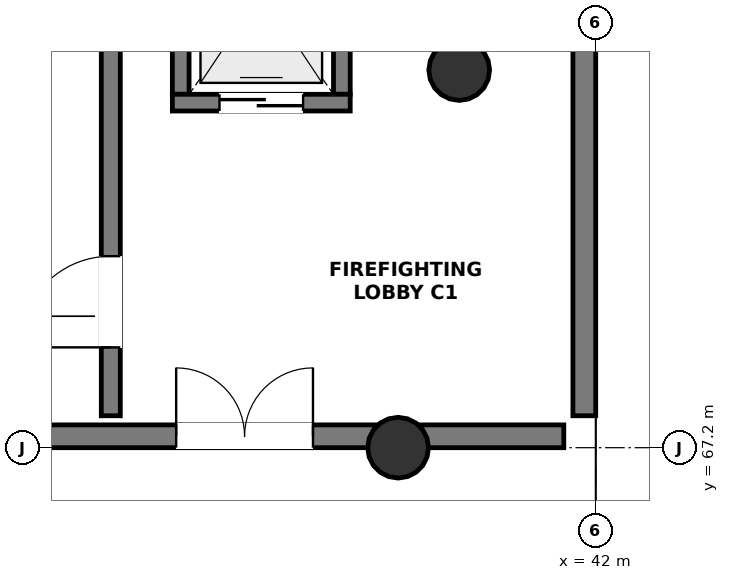
"""IFC4 building model, lengths in metres.
Left out: names, types, materials, properties, quantities, classifications, styles, units other than length and angle.
Written with IfcOpenShell. Run it as: python <this file> out.ifc"""

import sys

from ifc_helpers import new_model, si_unit, direction, frame, frame_2d, origin, origin_2d, place, context, subcontext, project, spatial, rectangle, circle, extrude, element, fill, save


model = new_model("IFC4")
c1 = context("Model", 3, precision=1e-05, world=origin(), true_north=direction((0.0, 1.0)))
c2 = subcontext(c1, "Body", "Model", "MODEL_VIEW")
j1 = project(units=[si_unit("LENGTHUNIT", "METRE"), si_unit("PLANEANGLEUNIT", "RADIAN")], contexts=[c1])
p1 = place(None, origin())
s1 = spatial("IfcSite", under=j1, at=p1, CompositionType="ELEMENT")
p2 = place(p1, origin())
s2 = spatial("IfcBuilding", under=s1, at=p2, CompositionType="ELEMENT")
p3 = place(p2, frame((0.0, 0.0, 5.1)))
s3 = spatial("IfcBuildingStorey", under=s2, at=p3, CompositionType="ELEMENT", Elevation=5.1)
for number, where, z_axis, x_axis in (
    (1, (40.204, 72.169, 0.0), (0.0, 0.0, 1.0), (1.0, 0.0, 0.0)),
    (2, (39.4, 67.2, 0.0), (0.0, 0.0, 1.0), (1.0, 0.0, 0.0)),
):
    element("IfcColumn", number, at=place(p3, frame(where, z_axis=z_axis, x_axis=x_axis)), inside=s3, PredefinedType="COLUMN", context=c2, shape_type="SweptSolid", body=[
        extrude(circle(Radius=0.4, at=origin_2d()), origin(), (0.0, 0.0, 1.0), 4.8),
    ])
p4 = place(p3, frame((25.62, 67.35, 0.0), z_axis=(0.0, 0.0, 1.0), x_axis=(1.0, 0.0, 0.0)))
e3 = element("IfcWall", 3, at=p4, inside=s3, PredefinedType="SHEAR", context=c2, shape_type="SweptSolid", body=[
    extrude(rectangle(XDim=15.96, YDim=0.3, at=frame_2d((7.98, 0.0))), origin(), (0.0, 0.0, 1.0), 4.5),
])
p5 = place(p4, frame((10.86, 0.0, 0.0)))
e4 = element("IfcOpeningElement", 4, at=p5, cuts=e3, PredefinedType="OPENING", context=c2, shape_type="SweptSolid", body=[
    extrude(rectangle(XDim=1.8, YDim=2.2, at=frame_2d((0.9, 1.1))), frame((0.0, 0.162, 0.0), z_axis=(0.0, -1.0, 0.0), x_axis=(1.0, 0.0, 0.0)), (0.0, 0.0, 1.0), 0.324),
])
p6 = place(p3, frame((41.85, 67.62, 0.0), z_axis=(0.0, 0.0, 1.0), x_axis=(0.0, 1.0, 0.0)))
e5 = element("IfcWall", 5, at=p6, inside=s3, PredefinedType="SHEAR", context=c2, shape_type="SweptSolid", body=[
    extrude(rectangle(XDim=7.56, YDim=0.3, at=frame_2d((3.78, 0.0))), origin(), (0.0, 0.0, 1.0), 4.5),
])
p7 = place(p3, frame((35.62, 67.62, 0.0), z_axis=(0.0, 0.0, 1.0), x_axis=(0.0, 1.0, 0.0)))
e6 = element("IfcWall", 6, at=p7, inside=s3, PredefinedType="SHEAR", context=c2, shape_type="SweptSolid", body=[
    extrude(rectangle(XDim=7.56, YDim=0.25, at=frame_2d((3.78, 0.0))), origin(), (0.0, 0.0, 1.0), 4.5),
])
p8 = place(p7, frame((0.9, 0.0, 0.0)))
e7 = element("IfcOpeningElement", 7, at=p8, cuts=e6, PredefinedType="OPENING", context=c2, shape_type="SweptSolid", body=[
    extrude(rectangle(XDim=1.2, YDim=2.2, at=frame_2d((0.6, 1.1))), frame((0.0, 0.137, 0.0), z_axis=(0.0, -1.0, 0.0), x_axis=(1.0, 0.0, 0.0)), (0.0, 0.0, 1.0), 0.274),
])
for number, where, z_axis, x_axis in (
    (8, (36.54, 71.85, 0.0), (0.0, 0.0, 1.0), (0.0, 1.0, 0.0)),
    (9, (38.66, 71.85, 0.0), (0.0, 0.0, 1.0), (0.0, 1.0, 0.0)),
):
    element("IfcWall", number, at=place(p3, frame(where, z_axis=z_axis, x_axis=x_axis)), inside=s3, PredefinedType="SOLIDWALL", context=c2, shape_type="SweptSolid", body=[
        extrude(rectangle(XDim=2.7, YDim=0.22, at=frame_2d((1.35, 0.0))), origin(), (0.0, 0.0, 1.0), 4.5),
    ])
p9 = place(p3, frame((36.43, 71.74, 0.0), z_axis=(0.0, 0.0, 1.0), x_axis=(1.0, 0.0, 0.0)))
e10 = element("IfcWall", 10, at=p9, inside=s3, PredefinedType="SOLIDWALL", context=c2, shape_type="SweptSolid", body=[
    extrude(rectangle(XDim=2.34, YDim=0.22, at=frame_2d((1.17, 0.0))), origin(), (0.0, 0.0, 1.0), 4.5),
])
p10 = place(p9, frame((0.62, 0.0, 0.0)))
e11 = element("IfcOpeningElement", 11, at=p10, cuts=e10, PredefinedType="OPENING", context=c2, shape_type="SweptSolid", body=[
    extrude(rectangle(XDim=1.1, YDim=2.15, at=frame_2d((0.55, 1.075))), frame((0.0, 0.122, 0.0), z_axis=(0.0, -1.0, 0.0), x_axis=(1.0, 0.0, 0.0)), (0.0, 0.0, 1.0), 0.244),
])
p11 = place(p5, origin())
e12 = element("IfcDoor", 12, at=p11, inside=s3, OperationType="DOUBLE_DOOR_SINGLE_SWING", PredefinedType="DOOR", context=c2, shape_type="SweptSolid", body=[
    extrude(rectangle(XDim=1.8, YDim=2.2, at=frame_2d((0.9, 1.1))), frame((0.0, 0.025, 0.0), z_axis=(0.0, -1.0, 0.0), x_axis=(1.0, 0.0, 0.0)), (0.0, 0.0, 1.0), 0.05),
])
fill(e4, e12)
p12 = place(p8, origin())
e13 = element("IfcDoor", 13, at=p12, inside=s3, OperationType="SINGLE_SWING_LEFT", PredefinedType="DOOR", context=c2, shape_type="SweptSolid", body=[
    extrude(rectangle(XDim=1.2, YDim=2.2, at=frame_2d((0.6, 1.1))), frame((0.0, 0.025, 0.0), z_axis=(0.0, -1.0, 0.0), x_axis=(1.0, 0.0, 0.0)), (0.0, 0.0, 1.0), 0.05),
])
fill(e7, e13)
p13 = place(p10, origin())
e14 = element("IfcDoor", 14, at=p13, inside=s3, OperationType="DOUBLE_DOOR_SLIDING", PredefinedType="DOOR", context=c2, shape_type="SweptSolid", body=[
    extrude(rectangle(XDim=1.1, YDim=2.15, at=frame_2d((0.55, 1.075))), frame((0.0, 0.025, 0.0), z_axis=(0.0, -1.0, 0.0), x_axis=(1.0, 0.0, 0.0)), (0.0, 0.0, 1.0), 0.05),
])
fill(e11, e14)
save(model, sys.argv[1])
